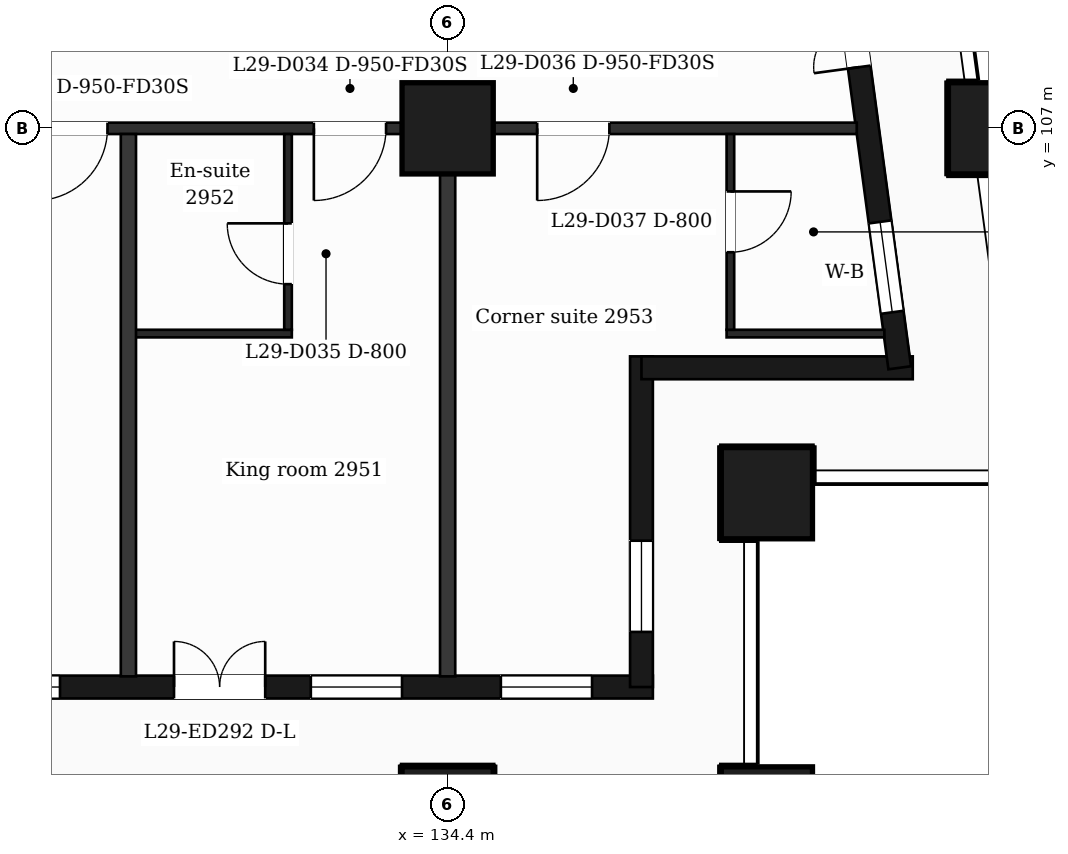
"""IFC4 building model, lengths in metres.
Left out: names, types, materials, properties, quantities, classifications, styles, units other than length and angle.
Written with IfcOpenShell. Run it as: python <this file> out.ifc"""

import sys

from ifc_helpers import new_model, si_unit, direction, frame, frame_2d, origin, origin_2d, place, context, subcontext, project, spatial, rectangle, extrude, element, fill, save


model = new_model("IFC4")
c1 = context("Model", 3, precision=1e-05, world=origin(), true_north=direction((0.0, 1.0)))
c2 = subcontext(c1, "Body", "Model", "MODEL_VIEW")
j1 = project(units=[si_unit("LENGTHUNIT", "METRE"), si_unit("PLANEANGLEUNIT", "RADIAN")], contexts=[c1])
p1 = place(None, origin())
s1 = spatial("IfcSite", under=j1, at=p1, CompositionType="ELEMENT")
p2 = place(p1, origin())
s2 = spatial("IfcBuilding", under=s1, at=p2, CompositionType="ELEMENT")
p3 = place(p2, frame((0.0, 0.0, 124.3)))
s3 = spatial("IfcBuildingStorey", under=s2, at=p3, CompositionType="ELEMENT", Elevation=124.3)
for number, where, z_axis, x_axis in (
    (1, (134.4, 98.0, 0.0), (0.0, 0.0, 1.0), (1.0, 0.0, 0.0)),
    (2, (138.6, 98.0, 0.0), (0.0, 0.0, 1.0), (1.0, 0.0, 0.0)),
    (3, (138.6, 102.2, 0.0), (0.0, 0.0, 1.0), (1.0, 0.0, 0.0)),
    (4, (134.4, 107.0, 0.0), (0.0, 0.0, 1.0), (1.0, 0.0, 0.0)),
    (5, (141.588, 107.0, 0.0), (0.0, 0.0, 1.0), (1.0, 0.0, 0.0)),
):
    element("IfcColumn", number, at=place(p3, frame(where, z_axis=z_axis, x_axis=x_axis)), inside=s3, PredefinedType="COLUMN", context=c2, shape_type="SweptSolid", body=[
        extrude(rectangle(XDim=1.2, YDim=1.2, at=origin_2d()), origin(), (0.0, 0.0, 1.0), 3.7),
    ])
p4 = place(p3, frame((89.85, 99.65, 0.0), z_axis=(0.0, 0.0, 1.0), x_axis=(1.0, 0.0, 0.0)))
e6 = element("IfcWall", 6, at=p4, inside=s3, PredefinedType="SOLIDWALL", context=c2, shape_type="SweptSolid", body=[
    extrude(rectangle(XDim=47.25, YDim=0.3, at=frame_2d((23.625, 0.0))), origin(), (0.0, 0.0, 1.0), 3.38),
])
p5 = place(p4, frame((0.725, 0.0, 0.9)))
e7 = element("IfcOpeningElement", 7, at=p5, cuts=e6, PredefinedType="OPENING", context=c2, shape_type="SweptSolid", body=[
    extrude(rectangle(XDim=1.2, YDim=2.1, at=frame_2d((0.6, 1.05))), frame((0.0, 0.16, 0.0), z_axis=(0.0, -1.0, 0.0), x_axis=(1.0, 0.0, 0.0)), (0.0, 0.0, 1.0), 0.32),
])
p6 = place(p4, frame((3.45, 0.0, 0.9)))
e8 = element("IfcOpeningElement", 8, at=p6, cuts=e6, PredefinedType="OPENING", context=c2, shape_type="SweptSolid", body=[
    extrude(rectangle(XDim=2.4, YDim=2.1, at=frame_2d((1.2, 1.05))), frame((0.0, 0.16, 0.0), z_axis=(0.0, -1.0, 0.0), x_axis=(1.0, 0.0, 0.0)), (0.0, 0.0, 1.0), 0.32),
])
p7 = place(p4, frame((7.65, 0.0, 0.9)))
e9 = element("IfcOpeningElement", 9, at=p7, cuts=e6, PredefinedType="OPENING", context=c2, shape_type="SweptSolid", body=[
    extrude(rectangle(XDim=2.4, YDim=2.1, at=frame_2d((1.2, 1.05))), frame((0.0, 0.16, 0.0), z_axis=(0.0, -1.0, 0.0), x_axis=(1.0, 0.0, 0.0)), (0.0, 0.0, 1.0), 0.32),
])
p8 = place(p4, frame((11.85, 0.0, 0.9)))
e10 = element("IfcOpeningElement", 10, at=p8, cuts=e6, PredefinedType="OPENING", context=c2, shape_type="SweptSolid", body=[
    extrude(rectangle(XDim=2.4, YDim=2.1, at=frame_2d((1.2, 1.05))), frame((0.0, 0.16, 0.0), z_axis=(0.0, -1.0, 0.0), x_axis=(1.0, 0.0, 0.0)), (0.0, 0.0, 1.0), 0.32),
])
p9 = place(p4, frame((16.05, 0.0, 0.9)))
e11 = element("IfcOpeningElement", 11, at=p9, cuts=e6, PredefinedType="OPENING", context=c2, shape_type="SweptSolid", body=[
    extrude(rectangle(XDim=2.4, YDim=2.1, at=frame_2d((1.2, 1.05))), frame((0.0, 0.16, 0.0), z_axis=(0.0, -1.0, 0.0), x_axis=(1.0, 0.0, 0.0)), (0.0, 0.0, 1.0), 0.32),
])
p10 = place(p4, frame((20.25, 0.0, 0.9)))
e12 = element("IfcOpeningElement", 12, at=p10, cuts=e6, PredefinedType="OPENING", context=c2, shape_type="SweptSolid", body=[
    extrude(rectangle(XDim=2.4, YDim=2.1, at=frame_2d((1.2, 1.05))), frame((0.0, 0.16, 0.0), z_axis=(0.0, -1.0, 0.0), x_axis=(1.0, 0.0, 0.0)), (0.0, 0.0, 1.0), 0.32),
])
p11 = place(p4, frame((25.05, 0.0, 0.9)))
e13 = element("IfcOpeningElement", 13, at=p11, cuts=e6, PredefinedType="OPENING", context=c2, shape_type="SweptSolid", body=[
    extrude(rectangle(XDim=1.2, YDim=2.1, at=frame_2d((0.6, 1.05))), frame((0.0, 0.16, 0.0), z_axis=(0.0, -1.0, 0.0), x_axis=(1.0, 0.0, 0.0)), (0.0, 0.0, 1.0), 0.32),
])
p12 = place(p4, frame((29.25, 0.0, 0.9)))
e14 = element("IfcOpeningElement", 14, at=p12, cuts=e6, PredefinedType="OPENING", context=c2, shape_type="SweptSolid", body=[
    extrude(rectangle(XDim=1.2, YDim=2.1, at=frame_2d((0.6, 1.05))), frame((0.0, 0.16, 0.0), z_axis=(0.0, -1.0, 0.0), x_axis=(1.0, 0.0, 0.0)), (0.0, 0.0, 1.0), 0.32),
])
p13 = place(p4, frame((32.55, 0.0, 0.0)))
e15 = element("IfcOpeningElement", 15, at=p13, cuts=e6, PredefinedType="OPENING", context=c2, shape_type="SweptSolid", body=[
    extrude(rectangle(XDim=1.2, YDim=2.4, at=frame_2d((0.6, 1.2))), frame((0.0, 0.16, 0.0), z_axis=(0.0, -1.0, 0.0), x_axis=(1.0, 0.0, 0.0)), (0.0, 0.0, 1.0), 0.32),
])
p14 = place(p4, frame((34.35, 0.0, 0.9)))
e16 = element("IfcOpeningElement", 16, at=p14, cuts=e6, PredefinedType="OPENING", context=c2, shape_type="SweptSolid", body=[
    extrude(rectangle(XDim=1.2, YDim=2.1, at=frame_2d((0.6, 1.05))), frame((0.0, 0.16, 0.0), z_axis=(0.0, -1.0, 0.0), x_axis=(1.0, 0.0, 0.0)), (0.0, 0.0, 1.0), 0.32),
])
p15 = place(p4, frame((37.05, 0.0, 0.9)))
e17 = element("IfcOpeningElement", 17, at=p15, cuts=e6, PredefinedType="OPENING", context=c2, shape_type="SweptSolid", body=[
    extrude(rectangle(XDim=2.4, YDim=2.1, at=frame_2d((1.2, 1.05))), frame((0.0, 0.16, 0.0), z_axis=(0.0, -1.0, 0.0), x_axis=(1.0, 0.0, 0.0)), (0.0, 0.0, 1.0), 0.32),
])
p16 = place(p4, frame((40.95, 0.0, 0.0)))
e18 = element("IfcOpeningElement", 18, at=p16, cuts=e6, PredefinedType="OPENING", context=c2, shape_type="SweptSolid", body=[
    extrude(rectangle(XDim=1.2, YDim=2.4, at=frame_2d((0.6, 1.2))), frame((0.0, 0.16, 0.0), z_axis=(0.0, -1.0, 0.0), x_axis=(1.0, 0.0, 0.0)), (0.0, 0.0, 1.0), 0.32),
])
p17 = place(p4, frame((42.75, 0.0, 0.9)))
e19 = element("IfcOpeningElement", 19, at=p17, cuts=e6, PredefinedType="OPENING", context=c2, shape_type="SweptSolid", body=[
    extrude(rectangle(XDim=1.2, YDim=2.1, at=frame_2d((0.6, 1.05))), frame((0.0, 0.16, 0.0), z_axis=(0.0, -1.0, 0.0), x_axis=(1.0, 0.0, 0.0)), (0.0, 0.0, 1.0), 0.32),
])
p18 = place(p4, frame((45.25, 0.0, 0.9)))
e20 = element("IfcOpeningElement", 20, at=p18, cuts=e6, PredefinedType="OPENING", context=c2, shape_type="SweptSolid", body=[
    extrude(rectangle(XDim=1.2, YDim=2.1, at=frame_2d((0.6, 1.05))), frame((0.0, 0.16, 0.0), z_axis=(0.0, -1.0, 0.0), x_axis=(1.0, 0.0, 0.0)), (0.0, 0.0, 1.0), 0.32),
])
p19 = place(p3, frame((136.95, 99.65, 0.0), z_axis=(0.0, 0.0, 1.0), x_axis=(0.0, 1.0, 0.0)))
e21 = element("IfcWall", 21, at=p19, inside=s3, PredefinedType="SOLIDWALL", context=c2, shape_type="SweptSolid", body=[
    extrude(rectangle(XDim=4.35, YDim=0.3, at=frame_2d((2.175, 0.0))), origin(), (0.0, 0.0, 1.0), 3.38),
])
p20 = place(p19, frame((0.725, 0.0, 0.9)))
e22 = element("IfcOpeningElement", 22, at=p20, cuts=e21, PredefinedType="OPENING", context=c2, shape_type="SweptSolid", body=[
    extrude(rectangle(XDim=1.2, YDim=2.1, at=frame_2d((0.6, 1.05))), frame((0.0, 0.16, 0.0), z_axis=(0.0, -1.0, 0.0), x_axis=(1.0, 0.0, 0.0)), (0.0, 0.0, 1.0), 0.32),
])
p21 = place(p3, frame((136.95, 103.85, 0.0), z_axis=(0.0, 0.0, 1.0), x_axis=(1.0, 0.0, 0.0)))
e23 = element("IfcWall", 23, at=p21, inside=s3, PredefinedType="SOLIDWALL", context=c2, shape_type="SweptSolid", body=[
    extrude(rectangle(XDim=3.569, YDim=0.3, at=frame_2d((1.785, 0.0))), origin(), (0.0, 0.0, 1.0), 3.38),
])
p22 = place(p3, frame((140.348, 103.85, 0.0), z_axis=(0.0, 0.0, 1.0), x_axis=(-0.133431549479, 0.991058031401, 0.0)))
e24 = element("IfcWall", 24, at=p22, inside=s3, PredefinedType="SOLIDWALL", context=c2, shape_type="SweptSolid", body=[
    extrude(rectangle(XDim=6.609, YDim=0.3, at=frame_2d((3.304, 0.0))), origin(), (0.0, 0.0, 1.0), 3.38),
])
p23 = place(p22, frame((0.737, 0.0, 0.9)))
e25 = element("IfcOpeningElement", 25, at=p23, cuts=e24, PredefinedType="OPENING", context=c2, shape_type="SweptSolid", body=[
    extrude(rectangle(XDim=1.2, YDim=2.1, at=frame_2d((0.6, 1.05))), frame((0.0, 0.16, 0.0), z_axis=(0.0, -1.0, 0.0), x_axis=(1.0, 0.0, 0.0)), (0.0, 0.0, 1.0), 0.32),
])
p24 = place(p22, frame((3.991, 0.0, 0.0)))
e26 = element("IfcOpeningElement", 26, at=p24, cuts=e24, PredefinedType="OPENING", context=c2, shape_type="SweptSolid", body=[
    extrude(rectangle(XDim=1.2, YDim=2.4, at=frame_2d((0.6, 1.2))), frame((0.0, 0.16, 0.0), z_axis=(0.0, -1.0, 0.0), x_axis=(1.0, 0.0, 0.0)), (0.0, 0.0, 1.0), 0.32),
])
p25 = place(p3, frame((130.2, 104.3, 0.0), z_axis=(0.0, 0.0, 1.0), x_axis=(1.0, 0.0, 0.0)))
e27 = element("IfcWall", 27, at=p25, inside=s3, PredefinedType="PARTITIONING", context=c2, shape_type="SweptSolid", body=[
    extrude(rectangle(XDim=2.15, YDim=0.1, at=frame_2d((1.075, 0.0))), origin(), (0.0, 0.0, 1.0), 3.38),
])
p26 = place(p3, frame((138.07, 104.3, 0.0), z_axis=(0.0, 0.0, 1.0), x_axis=(1.0, 0.0, 0.0)))
e28 = element("IfcWall", 28, at=p26, inside=s3, PredefinedType="PARTITIONING", context=c2, shape_type="SweptSolid", body=[
    extrude(rectangle(XDim=2.076, YDim=0.1, at=frame_2d((1.038, 0.0))), origin(), (0.0, 0.0, 1.0), 3.38),
])
p27 = place(p3, frame((87.018, 107.0, 0.0), z_axis=(0.0, 0.0, 1.0), x_axis=(1.0, 0.0, 0.0)))
e29 = element("IfcWall", 29, at=p27, inside=s3, PredefinedType="PARTITIONING", context=c2, shape_type="SweptSolid", body=[
    extrude(rectangle(XDim=52.765, YDim=0.15, at=frame_2d((26.382, 0.0))), origin(), (0.0, 0.0, 1.0), 3.38),
])
p28 = place(p27, frame((1.276, 0.0, 0.0)))
e30 = element("IfcOpeningElement", 30, at=p28, cuts=e29, PredefinedType="OPENING", context=c2, shape_type="SweptSolid", body=[
    extrude(rectangle(XDim=0.95, YDim=2.1, at=frame_2d((0.475, 1.05))), frame((0.0, 0.085, 0.0), z_axis=(0.0, -1.0, 0.0), x_axis=(1.0, 0.0, 0.0)), (0.0, 0.0, 1.0), 0.17),
])
p29 = place(p27, frame((6.192, 0.0, 0.0)))
e31 = element("IfcOpeningElement", 31, at=p29, cuts=e29, PredefinedType="OPENING", context=c2, shape_type="SweptSolid", body=[
    extrude(rectangle(XDim=0.95, YDim=2.1, at=frame_2d((0.475, 1.05))), frame((0.0, 0.085, 0.0), z_axis=(0.0, -1.0, 0.0), x_axis=(1.0, 0.0, 0.0)), (0.0, 0.0, 1.0), 0.17),
])
p30 = place(p27, frame((11.982, 0.0, 0.0)))
e32 = element("IfcOpeningElement", 32, at=p30, cuts=e29, PredefinedType="OPENING", context=c2, shape_type="SweptSolid", body=[
    extrude(rectangle(XDim=1.0, YDim=2.1, at=frame_2d((0.5, 1.05))), frame((0.0, 0.085, 0.0), z_axis=(0.0, -1.0, 0.0), x_axis=(1.0, 0.0, 0.0)), (0.0, 0.0, 1.0), 0.17),
])
p31 = place(p27, frame((14.582, 0.0, 0.0)))
e33 = element("IfcOpeningElement", 33, at=p31, cuts=e29, PredefinedType="OPENING", context=c2, shape_type="SweptSolid", body=[
    extrude(rectangle(XDim=0.95, YDim=2.1, at=frame_2d((0.475, 1.05))), frame((0.0, 0.085, 0.0), z_axis=(0.0, -1.0, 0.0), x_axis=(1.0, 0.0, 0.0)), (0.0, 0.0, 1.0), 0.17),
])
p32 = place(p27, frame((18.257, 0.0, 0.0)))
e34 = element("IfcOpeningElement", 34, at=p32, cuts=e29, PredefinedType="OPENING", context=c2, shape_type="SweptSolid", body=[
    extrude(rectangle(XDim=0.95, YDim=2.1, at=frame_2d((0.475, 1.05))), frame((0.0, 0.085, 0.0), z_axis=(0.0, -1.0, 0.0), x_axis=(1.0, 0.0, 0.0)), (0.0, 0.0, 1.0), 0.17),
])
p33 = place(p27, frame((22.992, 0.0, 0.0)))
e35 = element("IfcOpeningElement", 35, at=p33, cuts=e29, PredefinedType="OPENING", context=c2, shape_type="SweptSolid", body=[
    extrude(rectangle(XDim=0.95, YDim=2.1, at=frame_2d((0.475, 1.05))), frame((0.0, 0.085, 0.0), z_axis=(0.0, -1.0, 0.0), x_axis=(1.0, 0.0, 0.0)), (0.0, 0.0, 1.0), 0.17),
])
p34 = place(p27, frame((26.632, 0.0, 0.0)))
e36 = element("IfcOpeningElement", 36, at=p34, cuts=e29, PredefinedType="OPENING", context=c2, shape_type="SweptSolid", body=[
    extrude(rectangle(XDim=1.0, YDim=2.1, at=frame_2d((0.5, 1.05))), frame((0.0, 0.085, 0.0), z_axis=(0.0, -1.0, 0.0), x_axis=(1.0, 0.0, 0.0)), (0.0, 0.0, 1.0), 0.17),
])
p35 = place(p27, frame((33.557, 0.0, 0.0)))
e37 = element("IfcOpeningElement", 37, at=p35, cuts=e29, PredefinedType="OPENING", context=c2, shape_type="SweptSolid", body=[
    extrude(rectangle(XDim=0.95, YDim=2.1, at=frame_2d((0.475, 1.05))), frame((0.0, 0.085, 0.0), z_axis=(0.0, -1.0, 0.0), x_axis=(1.0, 0.0, 0.0)), (0.0, 0.0, 1.0), 0.17),
])
p36 = place(p27, frame((37.182, 0.0, 0.0)))
e38 = element("IfcOpeningElement", 38, at=p36, cuts=e29, PredefinedType="OPENING", context=c2, shape_type="SweptSolid", body=[
    extrude(rectangle(XDim=0.95, YDim=2.1, at=frame_2d((0.475, 1.05))), frame((0.0, 0.085, 0.0), z_axis=(0.0, -1.0, 0.0), x_axis=(1.0, 0.0, 0.0)), (0.0, 0.0, 1.0), 0.17),
])
p37 = place(p27, frame((41.957, 0.0, 0.0)))
e39 = element("IfcOpeningElement", 39, at=p37, cuts=e29, PredefinedType="OPENING", context=c2, shape_type="SweptSolid", body=[
    extrude(rectangle(XDim=0.95, YDim=2.1, at=frame_2d((0.475, 1.05))), frame((0.0, 0.085, 0.0), z_axis=(0.0, -1.0, 0.0), x_axis=(1.0, 0.0, 0.0)), (0.0, 0.0, 1.0), 0.17),
])
p38 = place(p27, frame((45.622, 0.0, 0.0)))
e40 = element("IfcOpeningElement", 40, at=p38, cuts=e29, PredefinedType="OPENING", context=c2, shape_type="SweptSolid", body=[
    extrude(rectangle(XDim=0.95, YDim=2.1, at=frame_2d((0.475, 1.05))), frame((0.0, 0.085, 0.0), z_axis=(0.0, -1.0, 0.0), x_axis=(1.0, 0.0, 0.0)), (0.0, 0.0, 1.0), 0.17),
])
p39 = place(p27, frame((48.56, 0.0, 0.0)))
e41 = element("IfcOpeningElement", 41, at=p39, cuts=e29, PredefinedType="OPENING", context=c2, shape_type="SweptSolid", body=[
    extrude(rectangle(XDim=0.95, YDim=2.1, at=frame_2d((0.475, 1.05))), frame((0.0, 0.085, 0.0), z_axis=(0.0, -1.0, 0.0), x_axis=(1.0, 0.0, 0.0)), (0.0, 0.0, 1.0), 0.17),
])
p40 = place(p3, frame((130.2, 99.79, 0.0), z_axis=(0.0, 0.0, 1.0), x_axis=(0.0, 1.0, 0.0)))
e42 = element("IfcWall", 42, at=p40, inside=s3, PredefinedType="PARTITIONING", context=c2, shape_type="SweptSolid", body=[
    extrude(rectangle(XDim=7.135, YDim=0.2, at=frame_2d((3.567, 0.0))), origin(), (0.0, 0.0, 1.0), 3.38),
])
p41 = place(p3, frame((132.3, 104.35, 0.0), z_axis=(0.0, 0.0, 1.0), x_axis=(0.0, 1.0, 0.0)))
e43 = element("IfcWall", 43, at=p41, inside=s3, PredefinedType="PARTITIONING", context=c2, shape_type="SweptSolid", body=[
    extrude(rectangle(XDim=2.575, YDim=0.1, at=frame_2d((1.288, 0.0))), origin(), (0.0, 0.0, 1.0), 3.38),
])
p42 = place(p41, frame((0.6, 0.0, 0.0)))
e44 = element("IfcOpeningElement", 44, at=p42, cuts=e43, PredefinedType="OPENING", context=c2, shape_type="SweptSolid", body=[
    extrude(rectangle(XDim=0.8, YDim=2.1, at=frame_2d((0.4, 1.05))), frame((0.0, 0.06, 0.0), z_axis=(0.0, -1.0, 0.0), x_axis=(1.0, 0.0, 0.0)), (0.0, 0.0, 1.0), 0.12),
])
p43 = place(p3, frame((134.4, 99.79, 0.0), z_axis=(0.0, 0.0, 1.0), x_axis=(0.0, 1.0, 0.0)))
e45 = element("IfcWall", 45, at=p43, inside=s3, PredefinedType="PARTITIONING", context=c2, shape_type="SweptSolid", body=[
    extrude(rectangle(XDim=7.135, YDim=0.2, at=frame_2d((3.567, 0.0))), origin(), (0.0, 0.0, 1.0), 3.38),
])
p44 = place(p3, frame((138.12, 104.35, 0.0), z_axis=(0.0, 0.0, 1.0), x_axis=(0.0, 1.0, 0.0)))
e46 = element("IfcWall", 46, at=p44, inside=s3, PredefinedType="PARTITIONING", context=c2, shape_type="SweptSolid", body=[
    extrude(rectangle(XDim=2.575, YDim=0.1, at=frame_2d((1.288, 0.0))), origin(), (0.0, 0.0, 1.0), 3.38),
])
p45 = place(p44, frame((1.02, 0.0, 0.0)))
e47 = element("IfcOpeningElement", 47, at=p45, cuts=e46, PredefinedType="OPENING", context=c2, shape_type="SweptSolid", body=[
    extrude(rectangle(XDim=0.8, YDim=2.1, at=frame_2d((0.4, 1.05))), frame((0.0, 0.06, 0.0), z_axis=(0.0, -1.0, 0.0), x_axis=(1.0, 0.0, 0.0)), (0.0, 0.0, 1.0), 0.12),
])
p46 = place(p15, origin())
e48 = element("IfcWindow", 48, at=p46, inside=s3, PartitioningType="SINGLE_PANEL", PredefinedType="WINDOW", context=c2, shape_type="SweptSolid", body=[
    extrude(rectangle(XDim=2.4, YDim=2.1, at=frame_2d((1.2, 1.05))), frame((0.0, 0.03, 0.0), z_axis=(0.0, -1.0, 0.0), x_axis=(1.0, 0.0, 0.0)), (0.0, 0.0, 1.0), 0.06),
])
fill(e17, e48)
p47 = place(p16, origin())
e49 = element("IfcDoor", 49, at=p47, inside=s3, OperationType="DOUBLE_DOOR_SINGLE_SWING", PredefinedType="DOOR", context=c2, shape_type="SweptSolid", body=[
    extrude(rectangle(XDim=1.2, YDim=2.4, at=frame_2d((0.6, 1.2))), frame((0.0, 0.025, 0.0), z_axis=(0.0, -1.0, 0.0), x_axis=(1.0, 0.0, 0.0)), (0.0, 0.0, 1.0), 0.05),
])
fill(e18, e49)
p48 = place(p17, origin())
e50 = element("IfcWindow", 50, at=p48, inside=s3, PartitioningType="SINGLE_PANEL", PredefinedType="WINDOW", context=c2, shape_type="SweptSolid", body=[
    extrude(rectangle(XDim=1.2, YDim=2.1, at=frame_2d((0.6, 1.05))), frame((0.0, 0.03, 0.0), z_axis=(0.0, -1.0, 0.0), x_axis=(1.0, 0.0, 0.0)), (0.0, 0.0, 1.0), 0.06),
])
fill(e19, e50)
p49 = place(p18, origin())
e51 = element("IfcWindow", 51, at=p49, inside=s3, PartitioningType="SINGLE_PANEL", PredefinedType="WINDOW", context=c2, shape_type="SweptSolid", body=[
    extrude(rectangle(XDim=1.2, YDim=2.1, at=frame_2d((0.6, 1.05))), frame((0.0, 0.03, 0.0), z_axis=(0.0, -1.0, 0.0), x_axis=(1.0, 0.0, 0.0)), (0.0, 0.0, 1.0), 0.06),
])
fill(e20, e51)
p50 = place(p20, origin())
e52 = element("IfcWindow", 52, at=p50, inside=s3, PartitioningType="SINGLE_PANEL", PredefinedType="WINDOW", context=c2, shape_type="SweptSolid", body=[
    extrude(rectangle(XDim=1.2, YDim=2.1, at=frame_2d((0.6, 1.05))), frame((0.0, 0.03, 0.0), z_axis=(0.0, -1.0, 0.0), x_axis=(1.0, 0.0, 0.0)), (0.0, 0.0, 1.0), 0.06),
])
fill(e22, e52)
p51 = place(p23, origin())
e53 = element("IfcWindow", 53, at=p51, inside=s3, PartitioningType="SINGLE_PANEL", PredefinedType="WINDOW", context=c2, shape_type="SweptSolid", body=[
    extrude(rectangle(XDim=1.2, YDim=2.1, at=frame_2d((0.6, 1.05))), frame((0.0, 0.03, 0.0), z_axis=(0.0, -1.0, 0.0), x_axis=(1.0, 0.0, 0.0)), (0.0, 0.0, 1.0), 0.06),
])
fill(e25, e53)
p52 = place(p24, origin())
e54 = element("IfcDoor", 54, at=p52, inside=s3, OperationType="DOUBLE_DOOR_SINGLE_SWING", PredefinedType="DOOR", context=c2, shape_type="SweptSolid", body=[
    extrude(rectangle(XDim=1.2, YDim=2.4, at=frame_2d((0.6, 1.2))), frame((0.0, 0.025, 0.0), z_axis=(0.0, -1.0, 0.0), x_axis=(1.0, 0.0, 0.0)), (0.0, 0.0, 1.0), 0.05),
])
fill(e26, e54)
p53 = place(p37, origin())
e55 = element("IfcDoor", 55, at=p53, inside=s3, OperationType="SINGLE_SWING_LEFT", PredefinedType="DOOR", context=c2, shape_type="SweptSolid", body=[
    extrude(rectangle(XDim=0.95, YDim=2.1, at=frame_2d((0.475, 1.05))), frame((0.0, 0.025, 0.0), z_axis=(0.0, -1.0, 0.0), x_axis=(1.0, 0.0, 0.0)), (0.0, 0.0, 1.0), 0.05),
])
fill(e39, e55)
p54 = place(p38, origin())
e56 = element("IfcDoor", 56, at=p54, inside=s3, OperationType="SINGLE_SWING_LEFT", PredefinedType="DOOR", context=c2, shape_type="SweptSolid", body=[
    extrude(rectangle(XDim=0.95, YDim=2.1, at=frame_2d((0.475, 1.05))), frame((0.0, 0.025, 0.0), z_axis=(0.0, -1.0, 0.0), x_axis=(1.0, 0.0, 0.0)), (0.0, 0.0, 1.0), 0.05),
])
fill(e40, e56)
p55 = place(p42, origin())
e57 = element("IfcDoor", 57, at=p55, inside=s3, OperationType="SINGLE_SWING_RIGHT", PredefinedType="DOOR", context=c2, shape_type="SweptSolid", body=[
    extrude(rectangle(XDim=0.8, YDim=2.1, at=frame_2d((0.4, 1.05))), frame((0.0, 0.025, 0.0), z_axis=(0.0, -1.0, 0.0), x_axis=(1.0, 0.0, 0.0)), (0.0, 0.0, 1.0), 0.05),
])
fill(e44, e57)
p56 = place(p39, origin())
e58 = element("IfcDoor", 58, at=p56, inside=s3, OperationType="SINGLE_SWING_LEFT", PredefinedType="DOOR", context=c2, shape_type="SweptSolid", body=[
    extrude(rectangle(XDim=0.95, YDim=2.1, at=frame_2d((0.475, 1.05))), frame((0.0, 0.025, 0.0), z_axis=(0.0, -1.0, 0.0), x_axis=(1.0, 0.0, 0.0)), (0.0, 0.0, 1.0), 0.05),
])
fill(e41, e58)
p57 = place(p45, origin())
e59 = element("IfcDoor", 59, at=p57, inside=s3, OperationType="SINGLE_SWING_RIGHT", PredefinedType="DOOR", context=c2, shape_type="SweptSolid", body=[
    extrude(rectangle(XDim=0.8, YDim=2.1, at=frame_2d((0.4, 1.05))), frame((0.0, 0.025, 0.0), z_axis=(0.0, -1.0, 0.0), x_axis=(1.0, 0.0, 0.0)), (0.0, 0.0, 1.0), 0.05),
])
fill(e47, e59)
save(model, sys.argv[1])
